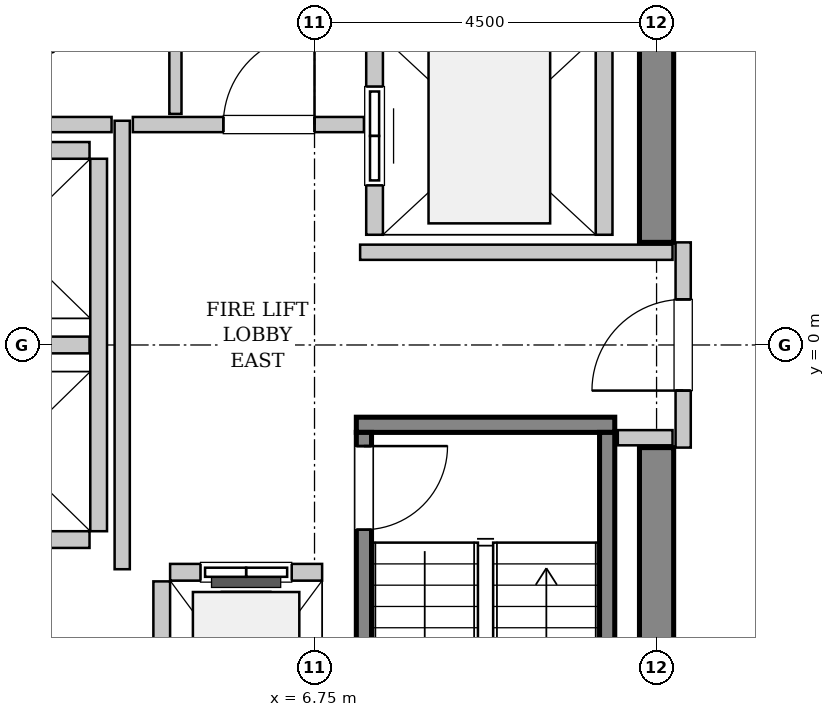
"""IFC4 building model, lengths in metres.
Left out: names, types, materials, properties, quantities, classifications, styles, units other than length and angle.
Written with IfcOpenShell. Run it as: python <this file> out.ifc"""

import sys

from ifc_helpers import new_model, si_unit, direction, frame, frame_2d, origin, place, context, subcontext, project, spatial, rectangle, extrude, source, transform, mapped, element, fill, save


model = new_model("IFC4")
c1 = context("Model", 3, precision=1e-05, world=origin(), true_north=direction((0.0, 1.0)))
c2 = subcontext(c1, "Body", "Model", "MODEL_VIEW")
j1 = project(units=[si_unit("LENGTHUNIT", "METRE"), si_unit("PLANEANGLEUNIT", "RADIAN")], contexts=[c1])
p1 = place(None, origin())
s1 = spatial("IfcSite", under=j1, at=p1, CompositionType="ELEMENT")
p2 = place(p1, origin())
s2 = spatial("IfcBuilding", under=s1, at=p2, CompositionType="ELEMENT")
p3 = place(p2, frame((0.0, 0.0, 233.2)))
s3 = spatial("IfcBuildingStorey", under=s2, at=p3, CompositionType="ELEMENT", Elevation=233.2)
m1 = source(origin(), c2, "Body", "SweptSolid", [
    extrude(rectangle(XDim=7.425, YDim=0.45, at=frame_2d((3.712, 0.0))), origin(), (0.0, 0.0, 1.0), 3.8),
])
for number, where, z_axis, x_axis in (
    (1, (11.25, -8.775, 0.0), (0.0, 0.0, 1.0), (0.0, 1.0, 0.0)),
    (2, (11.25, 1.35, 0.0), (0.0, 0.0, 1.0), (0.0, 1.0, 0.0)),
):
    element("IfcWall", number, at=place(p3, frame(where, z_axis=z_axis, x_axis=x_axis)), inside=s3, PredefinedType="SHEAR", context=c2, shape_type="MappedRepresentation", body=[
        mapped(m1, transform((0.0, 0.0, 0.0), x_axis=(1.0, 0.0, 0.0), y_axis=(0.0, 1.0, 0.0), z_axis=(0.0, 0.0, 1.0), scale=1.0)),
    ])
m2 = source(origin(), c2, "Body", "SweptSolid", [
    extrude(rectangle(XDim=3.4, YDim=0.2, at=frame_2d((1.7, 0.0))), origin(), (0.0, 0.0, 1.0), 3.8),
])
p4 = place(p3, frame((7.3, -1.05, 0.0), z_axis=(0.0, 0.0, 1.0), x_axis=(1.0, 0.0, 0.0)))
e3 = element("IfcWall", 3, at=p4, inside=s3, PredefinedType="SOLIDWALL", context=c2, shape_type="MappedRepresentation", body=[
    mapped(m2, transform((0.0, 0.0, 0.0), x_axis=(1.0, 0.0, 0.0), y_axis=(0.0, 1.0, 0.0), z_axis=(0.0, 0.0, 1.0), scale=1.0)),
])
m3 = source(origin(), c2, "Body", "SweptSolid", [
    extrude(rectangle(XDim=7.1, YDim=0.2, at=frame_2d((3.55, 0.0))), origin(), (0.0, 0.0, 1.0), 3.8),
])
p5 = place(p3, frame((7.4, -1.15, 0.0), z_axis=(0.0, 0.0, 1.0), x_axis=(0.0, -1.0, 0.0)))
e4 = element("IfcWall", 4, at=p5, inside=s3, PredefinedType="SOLIDWALL", context=c2, shape_type="MappedRepresentation", body=[
    mapped(m3, transform((0.0, 0.0, 0.0), x_axis=(1.0, 0.0, 0.0), y_axis=(0.0, 1.0, 0.0), z_axis=(0.0, 0.0, 1.0), scale=1.0)),
])
p6 = place(p5, frame((0.18, 0.0, 0.0)))
e5 = element("IfcOpeningElement", 5, at=p6, cuts=e4, PredefinedType="OPENING", context=c2, shape_type="SweptSolid", body=[
    extrude(rectangle(XDim=1.1, YDim=2.15, at=frame_2d((0.55, 1.075))), frame((0.0, 0.11, 0.0), z_axis=(0.0, -1.0, 0.0), x_axis=(1.0, 0.0, 0.0)), (0.0, 0.0, 1.0), 0.22),
])
p7 = place(p3, frame((10.6, -1.15, 0.0), z_axis=(0.0, 0.0, 1.0), x_axis=(0.0, -1.0, 0.0)))
e6 = element("IfcWall", 6, at=p7, inside=s3, PredefinedType="SOLIDWALL", context=c2, shape_type="MappedRepresentation", body=[
    mapped(m3, transform((0.0, 0.0, 0.0), x_axis=(1.0, 0.0, 0.0), y_axis=(0.0, 1.0, 0.0), z_axis=(0.0, 0.0, 1.0), scale=1.0)),
])
m4 = source(origin(), c2, "Body", "SweptSolid", [
    extrude(rectangle(XDim=2.0, YDim=0.22, at=frame_2d((1.0, 0.0))), origin(), (0.0, 0.0, 1.0), 3.535),
])
p8 = place(p3, frame((6.85, -2.99, 0.0), z_axis=(0.0, 0.0, 1.0), x_axis=(-1.0, 0.0, 0.0)))
e7 = element("IfcWall", 7, at=p8, inside=s3, PredefinedType="SOLIDWALL", context=c2, shape_type="MappedRepresentation", body=[
    mapped(m4, transform((0.0, 0.0, 0.0), x_axis=(1.0, 0.0, 0.0), y_axis=(0.0, 1.0, 0.0), z_axis=(0.0, 0.0, 1.0), scale=1.0)),
])
p9 = place(p8, frame((0.4, 0.0, 0.0)))
e8 = element("IfcOpeningElement", 8, at=p9, cuts=e7, PredefinedType="OPENING", context=c2, shape_type="SweptSolid", body=[
    extrude(rectangle(XDim=1.2, YDim=2.2, at=frame_2d((0.6, 1.1))), frame((0.0, 0.12, 0.0), z_axis=(0.0, -1.0, 0.0), x_axis=(1.0, 0.0, 0.0)), (0.0, 0.0, 1.0), 0.24),
])
m5 = source(origin(), c2, "Body", "SweptSolid", [
    extrude(rectangle(XDim=2.68, YDim=0.22, at=frame_2d((1.34, 0.0))), origin(), (0.0, 0.0, 1.0), 3.535),
])
p10 = place(p3, frame((4.74, -3.11, 0.0), z_axis=(0.0, 0.0, 1.0), x_axis=(0.0, -1.0, 0.0)))
e9 = element("IfcWall", 9, at=p10, inside=s3, PredefinedType="SOLIDWALL", context=c2, shape_type="MappedRepresentation", body=[
    mapped(m5, transform((0.0, 0.0, 0.0), x_axis=(1.0, 0.0, 0.0), y_axis=(0.0, 1.0, 0.0), z_axis=(0.0, 0.0, 1.0), scale=1.0)),
])
m6 = source(origin(), c2, "Body", "SweptSolid", [
    extrude(rectangle(XDim=5.45, YDim=0.22, at=frame_2d((2.725, 0.0))), origin(), (0.0, 0.0, 1.0), 3.535),
])
p11 = place(p3, frame((7.54, 6.9, 0.0), z_axis=(0.0, 0.0, 1.0), x_axis=(0.0, -1.0, 0.0)))
e10 = element("IfcWall", 10, at=p11, inside=s3, PredefinedType="SOLIDWALL", context=c2, shape_type="MappedRepresentation", body=[
    mapped(m6, transform((0.0, 0.0, 0.0), x_axis=(1.0, 0.0, 0.0), y_axis=(0.0, 1.0, 0.0), z_axis=(0.0, 0.0, 1.0), scale=1.0)),
])
p12 = place(p11, frame((3.5, 0.0, 0.0)))
e11 = element("IfcOpeningElement", 11, at=p12, cuts=e10, PredefinedType="OPENING", context=c2, shape_type="SweptSolid", body=[
    extrude(rectangle(XDim=1.3, YDim=2.3, at=frame_2d((0.65, 1.15))), frame((0.0, 0.12, 0.0), z_axis=(0.0, -1.0, 0.0), x_axis=(1.0, 0.0, 0.0)), (0.0, 0.0, 1.0), 0.24),
])
p13 = place(p11, frame((0.65, 0.0, 0.0)))
e12 = element("IfcOpeningElement", 12, at=p13, cuts=e10, PredefinedType="OPENING", context=c2, shape_type="SweptSolid", body=[
    extrude(rectangle(XDim=1.3, YDim=2.3, at=frame_2d((0.65, 1.15))), frame((0.0, 0.12, 0.0), z_axis=(0.0, -1.0, 0.0), x_axis=(1.0, 0.0, 0.0)), (0.0, 0.0, 1.0), 0.24),
])
p14 = place(p3, frame((10.56, 1.45, 0.0), z_axis=(0.0, 0.0, 1.0), x_axis=(0.0, 1.0, 0.0)))
e13 = element("IfcWall", 13, at=p14, inside=s3, PredefinedType="SOLIDWALL", context=c2, shape_type="MappedRepresentation", body=[
    mapped(m6, transform((0.0, 0.0, 0.0), x_axis=(1.0, 0.0, 0.0), y_axis=(0.0, 1.0, 0.0), z_axis=(0.0, 0.0, 1.0), scale=1.0)),
])
m7 = source(origin(), c2, "Body", "SweptSolid", [
    extrude(rectangle(XDim=4.9, YDim=0.22, at=frame_2d((2.45, 0.0))), origin(), (0.0, 0.0, 1.0), 3.535),
])
p15 = place(p3, frame((3.91, -2.45, 0.0), z_axis=(0.0, 0.0, 1.0), x_axis=(0.0, 1.0, 0.0)))
e14 = element("IfcWall", 14, at=p15, inside=s3, PredefinedType="SOLIDWALL", context=c2, shape_type="MappedRepresentation", body=[
    mapped(m7, transform((0.0, 0.0, 0.0), x_axis=(1.0, 0.0, 0.0), y_axis=(0.0, 1.0, 0.0), z_axis=(0.0, 0.0, 1.0), scale=1.0)),
])
m8 = source(origin(), c2, "Body", "SweptSolid", [
    extrude(rectangle(XDim=2.13, YDim=0.22, at=frame_2d((1.065, 0.0))), origin(), (0.0, 0.0, 1.0), 3.535),
])
for number, where, z_axis, x_axis in (
    (15, (1.66, -2.56, 0.0), (0.0, 0.0, 1.0), (1.0, 0.0, 0.0)),
    (16, (1.66, 0.0, 0.0), (0.0, 0.0, 1.0), (1.0, 0.0, 0.0)),
    (17, (3.79, 2.56, 0.0), (0.0, 0.0, 1.0), (-1.0, 0.0, 0.0)),
):
    element("IfcWall", number, at=place(p3, frame(where, z_axis=z_axis, x_axis=x_axis)), inside=s3, PredefinedType="SOLIDWALL", context=c2, shape_type="MappedRepresentation", body=[
        mapped(m8, transform((0.0, 0.0, 0.0), x_axis=(1.0, 0.0, 0.0), y_axis=(0.0, 1.0, 0.0), z_axis=(0.0, 0.0, 1.0), scale=1.0)),
    ])
m9 = source(origin(), c2, "Body", "SweptSolid", [
    extrude(rectangle(XDim=2.7, YDim=0.2, at=frame_2d((1.35, 0.0))), origin(), (0.0, 0.0, 1.0), 2.625),
])
p16 = place(p3, frame((11.6, -1.35, 0.0), z_axis=(0.0, 0.0, 1.0), x_axis=(0.0, 1.0, 0.0)))
e18 = element("IfcWall", 18, at=p16, inside=s3, PredefinedType="PARTITIONING", context=c2, shape_type="MappedRepresentation", body=[
    mapped(m9, transform((0.0, 0.0, 0.0), x_axis=(1.0, 0.0, 0.0), y_axis=(0.0, 1.0, 0.0), z_axis=(0.0, 0.0, 1.0), scale=1.0)),
])
p17 = place(p16, frame((0.75, 0.0, 0.0)))
e19 = element("IfcOpeningElement", 19, at=p17, cuts=e18, PredefinedType="OPENING", context=c2, shape_type="SweptSolid", body=[
    extrude(rectangle(XDim=1.2, YDim=2.15, at=frame_2d((0.6, 1.075))), frame((0.0, 0.11, 0.0), z_axis=(0.0, -1.0, 0.0), x_axis=(1.0, 0.0, 0.0)), (0.0, 0.0, 1.0), 0.22),
])
m10 = source(origin(), c2, "Body", "SweptSolid", [
    extrude(rectangle(XDim=5.9, YDim=0.2, at=frame_2d((2.95, 0.0))), origin(), (0.0, 0.0, 1.0), 3.535),
])
p18 = place(p3, frame((4.22, -2.95, 0.0), z_axis=(0.0, 0.0, 1.0), x_axis=(0.0, 1.0, 0.0)))
e20 = element("IfcWall", 20, at=p18, inside=s3, PredefinedType="PARTITIONING", context=c2, shape_type="MappedRepresentation", body=[
    mapped(m10, transform((0.0, 0.0, 0.0), x_axis=(1.0, 0.0, 0.0), y_axis=(0.0, 1.0, 0.0), z_axis=(0.0, 0.0, 1.0), scale=1.0)),
])
m11 = source(origin(), c2, "Body", "SweptSolid", [
    extrude(rectangle(XDim=2.52, YDim=0.2, at=frame_2d((1.26, 0.0))), origin(), (0.0, 0.0, 1.0), 3.535),
])
p19 = place(p3, frame((1.56, 2.9, 0.0), z_axis=(0.0, 0.0, 1.0), x_axis=(1.0, 0.0, 0.0)))
e21 = element("IfcWall", 21, at=p19, inside=s3, PredefinedType="PARTITIONING", context=c2, shape_type="MappedRepresentation", body=[
    mapped(m11, transform((0.0, 0.0, 0.0), x_axis=(1.0, 0.0, 0.0), y_axis=(0.0, 1.0, 0.0), z_axis=(0.0, 0.0, 1.0), scale=1.0)),
])
m12 = source(origin(), c2, "Body", "SweptSolid", [
    extrude(rectangle(XDim=3.04, YDim=0.2, at=frame_2d((1.52, 0.0))), origin(), (0.0, 0.0, 1.0), 3.535),
])
p20 = place(p3, frame((4.36, 2.9, 0.0), z_axis=(0.0, 0.0, 1.0), x_axis=(1.0, 0.0, 0.0)))
e22 = element("IfcWall", 22, at=p20, inside=s3, PredefinedType="PARTITIONING", context=c2, shape_type="MappedRepresentation", body=[
    mapped(m12, transform((0.0, 0.0, 0.0), x_axis=(1.0, 0.0, 0.0), y_axis=(0.0, 1.0, 0.0), z_axis=(0.0, 0.0, 1.0), scale=1.0)),
])
p21 = place(p20, frame((1.19, 0.0, 0.0)))
e23 = element("IfcOpeningElement", 23, at=p21, cuts=e22, PredefinedType="OPENING", context=c2, shape_type="SweptSolid", body=[
    extrude(rectangle(XDim=1.2, YDim=2.15, at=frame_2d((0.6, 1.075))), frame((0.0, 0.11, 0.0), z_axis=(0.0, -1.0, 0.0), x_axis=(1.0, 0.0, 0.0)), (0.0, 0.0, 1.0), 0.22),
])
m13 = source(origin(), c2, "Body", "SweptSolid", [
    extrude(rectangle(XDim=4.11, YDim=0.2, at=frame_2d((2.055, 0.0))), origin(), (0.0, 0.0, 1.0), 3.535),
])
p22 = place(p3, frame((7.35, 1.22, 0.0), z_axis=(0.0, 0.0, 1.0), x_axis=(1.0, 0.0, 0.0)))
e24 = element("IfcWall", 24, at=p22, inside=s3, PredefinedType="PARTITIONING", context=c2, shape_type="MappedRepresentation", body=[
    mapped(m13, transform((0.0, 0.0, 0.0), x_axis=(1.0, 0.0, 0.0), y_axis=(0.0, 1.0, 0.0), z_axis=(0.0, 0.0, 1.0), scale=1.0)),
])
m14 = source(origin(), c2, "Body", "SweptSolid", [
    extrude(rectangle(XDim=0.72, YDim=0.2, at=frame_2d((0.36, 0.0))), origin(), (0.0, 0.0, 1.0), 3.535),
])
p23 = place(p3, frame((10.74, -1.22, 0.0), z_axis=(0.0, 0.0, 1.0), x_axis=(1.0, 0.0, 0.0)))
e25 = element("IfcWall", 25, at=p23, inside=s3, PredefinedType="PARTITIONING", context=c2, shape_type="MappedRepresentation", body=[
    mapped(m14, transform((0.0, 0.0, 0.0), x_axis=(1.0, 0.0, 0.0), y_axis=(0.0, 1.0, 0.0), z_axis=(0.0, 0.0, 1.0), scale=1.0)),
])
m15 = source(origin(), c2, "Body", "SweptSolid", [
    extrude(rectangle(XDim=5.45, YDim=0.16, at=frame_2d((2.725, 0.0))), origin(), (0.0, 0.0, 1.0), 3.535),
])
p24 = place(p3, frame((4.92, 3.04, 0.0), z_axis=(0.0, 0.0, 1.0), x_axis=(0.0, 1.0, 0.0)))
e26 = element("IfcWall", 26, at=p24, inside=s3, PredefinedType="PARTITIONING", context=c2, shape_type="MappedRepresentation", body=[
    mapped(m15, transform((0.0, 0.0, 0.0), x_axis=(1.0, 0.0, 0.0), y_axis=(0.0, 1.0, 0.0), z_axis=(0.0, 0.0, 1.0), scale=1.0)),
])
m16 = source(origin(), c2, "Body", "SweptSolid", [
    extrude(rectangle(XDim=1.1, YDim=2.15, at=frame_2d((0.55, 1.075))), frame((0.0, 0.025, 0.0), z_axis=(0.0, -1.0, 0.0), x_axis=(1.0, 0.0, 0.0)), (0.0, 0.0, 1.0), 0.05),
])
p25 = place(p6, origin())
e27 = element("IfcDoor", 27, at=p25, inside=s3, OperationType="SINGLE_SWING_LEFT", PredefinedType="DOOR", context=c2, shape_type="MappedRepresentation", body=[
    mapped(m16, transform((0.0, 0.0, 0.0), x_axis=(1.0, 0.0, 0.0), y_axis=(0.0, 1.0, 0.0), z_axis=(0.0, 0.0, 1.0), scale=1.0)),
])
fill(e5, e27)
m17 = source(origin(), c2, "Body", "SweptSolid", [
    extrude(rectangle(XDim=1.2, YDim=2.2, at=frame_2d((0.6, 1.1))), frame((0.0, 0.025, 0.0), z_axis=(0.0, -1.0, 0.0), x_axis=(1.0, 0.0, 0.0)), (0.0, 0.0, 1.0), 0.05),
])
p26 = place(p9, origin())
e28 = element("IfcDoor", 28, at=p26, inside=s3, OperationType="SLIDING_TO_LEFT", PredefinedType="DOOR", context=c2, shape_type="MappedRepresentation", body=[
    mapped(m17, transform((0.0, 0.0, 0.0), x_axis=(1.0, 0.0, 0.0), y_axis=(0.0, 1.0, 0.0), z_axis=(0.0, 0.0, 1.0), scale=1.0)),
])
fill(e8, e28)
m18 = source(origin(), c2, "Body", "SweptSolid", [
    extrude(rectangle(XDim=1.3, YDim=2.3, at=frame_2d((0.65, 1.15))), frame((0.0, 0.025, 0.0), z_axis=(0.0, -1.0, 0.0), x_axis=(1.0, 0.0, 0.0)), (0.0, 0.0, 1.0), 0.05),
])
p27 = place(p12, origin())
e29 = element("IfcDoor", 29, at=p27, inside=s3, OperationType="SLIDING_TO_RIGHT", PredefinedType="DOOR", context=c2, shape_type="MappedRepresentation", body=[
    mapped(m18, transform((0.0, 0.0, 0.0), x_axis=(1.0, 0.0, 0.0), y_axis=(0.0, 1.0, 0.0), z_axis=(0.0, 0.0, 1.0), scale=1.0)),
])
fill(e11, e29)
m19 = source(origin(), c2, "Body", "SweptSolid", [
    extrude(rectangle(XDim=1.2, YDim=2.15, at=frame_2d((0.6, 1.075))), frame((0.0, 0.025, 0.0), z_axis=(0.0, -1.0, 0.0), x_axis=(1.0, 0.0, 0.0)), (0.0, 0.0, 1.0), 0.05),
])
p28 = place(p17, origin())
e30 = element("IfcDoor", 30, at=p28, inside=s3, OperationType="SINGLE_SWING_LEFT", PredefinedType="DOOR", context=c2, shape_type="MappedRepresentation", body=[
    mapped(m19, transform((0.0, 0.0, 0.0), x_axis=(1.0, 0.0, 0.0), y_axis=(0.0, 1.0, 0.0), z_axis=(0.0, 0.0, 1.0), scale=1.0)),
])
fill(e19, e30)
p29 = place(p21, origin())
e31 = element("IfcDoor", 31, at=p29, inside=s3, OperationType="SINGLE_SWING_RIGHT", PredefinedType="DOOR", context=c2, shape_type="MappedRepresentation", body=[
    mapped(m19, transform((0.0, 0.0, 0.0), x_axis=(1.0, 0.0, 0.0), y_axis=(0.0, 1.0, 0.0), z_axis=(0.0, 0.0, 1.0), scale=1.0)),
])
fill(e23, e31)
save(model, sys.argv[1])
